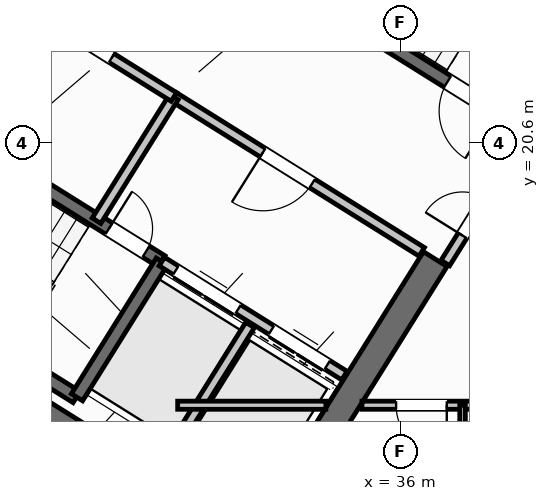
"""IFC4 building model, lengths in metres.
Left out: names, types, materials, properties, quantities, classifications, styles, units other than length and angle.
Written with IfcOpenShell. Run it as: python <this file> out.ifc"""

import sys

from ifc_helpers import new_model, si_unit, direction, frame, frame_2d, origin, place, context, subcontext, project, spatial, rectangle, extrude, source, transform, mapped, element, fill, save


model = new_model("IFC4")
c1 = context("Model", 3, precision=1e-05, world=origin(), true_north=direction((0.0, 1.0)))
c2 = subcontext(c1, "Body", "Model", "MODEL_VIEW")
j1 = project(units=[si_unit("LENGTHUNIT", "METRE"), si_unit("PLANEANGLEUNIT", "RADIAN")], contexts=[c1])
p1 = place(None, origin())
s1 = spatial("IfcSite", under=j1, at=p1, CompositionType="ELEMENT")
p2 = place(p1, origin())
s2 = spatial("IfcBuilding", under=s1, at=p2, CompositionType="ELEMENT")
p3 = place(p2, frame((0.0, 0.0, 119.7)))
s3 = spatial("IfcBuildingStorey", under=s2, at=p3, CompositionType="ELEMENT", Elevation=119.7)
p4 = place(p3, frame((33.366, 12.477, 0.0), z_axis=(0.0, 0.0, 1.0), x_axis=(-0.848047359947, 0.529920442413, 0.0)))
e1 = element("IfcWall", 1, at=p4, inside=s3, PredefinedType="SHEAR", context=c2, shape_type="SweptSolid", body=[
    extrude(rectangle(XDim=13.14, YDim=0.55, at=frame_2d((6.57, 0.0))), origin(), (0.0, 0.0, 1.0), 3.35),
])
p5 = place(p3, frame((36.683, 18.304, 0.0), z_axis=(0.0, 0.0, 1.0), x_axis=(-0.529896466841, -0.848062341122, 0.0)))
e2 = element("IfcWall", 2, at=p5, inside=s3, PredefinedType="SHEAR", context=c2, shape_type="SweptSolid", body=[
    extrude(rectangle(XDim=6.425, YDim=0.55, at=frame_2d((3.212, 0.0))), origin(), (0.0, 0.0, 1.0), 3.35),
])
p6 = place(p3, frame((31.76, 12.183, 0.0), z_axis=(0.0, 0.0, 1.0), x_axis=(-0.848047074256, 0.529920899612, 0.0)))
e3 = element("IfcWall", 3, at=p6, inside=s3, PredefinedType="STANDARD", context=c2, shape_type="SweptSolid", body=[
    extrude(rectangle(XDim=30.652, YDim=0.32, at=frame_2d((15.326, 0.0))), origin(), (0.0, 0.0, 1.0), 3.35),
])
p7 = place(p6, frame((15.153, 0.0, 0.0)))
e4 = element("IfcOpeningElement", 4, at=p7, cuts=e3, PredefinedType="OPENING", context=c2, shape_type="SweptSolid", body=[
    extrude(rectangle(XDim=1.2, YDim=2.15, at=frame_2d((0.6, 1.075))), frame((0.0, 0.17, 0.0), z_axis=(0.0, -1.0, 0.0), x_axis=(1.0, 0.0, 0.0)), (0.0, 0.0, 1.0), 0.34),
])
p8 = place(p6, frame((2.002, 0.0, 0.8)))
e5 = element("IfcOpeningElement", 5, at=p8, cuts=e3, PredefinedType="OPENING", context=c2, shape_type="SweptSolid", body=[
    extrude(rectangle(XDim=2.1, YDim=1.55, at=frame_2d((1.05, 0.775))), frame((0.0, 0.17, 0.0), z_axis=(0.0, -1.0, 0.0), x_axis=(1.0, 0.0, 0.0)), (0.0, 0.0, 1.0), 0.34),
])
p9 = place(p6, frame((7.206, 0.0, 0.8)))
e6 = element("IfcOpeningElement", 6, at=p9, cuts=e3, PredefinedType="OPENING", context=c2, shape_type="SweptSolid", body=[
    extrude(rectangle(XDim=2.1, YDim=1.55, at=frame_2d((1.05, 0.775))), frame((0.0, 0.17, 0.0), z_axis=(0.0, -1.0, 0.0), x_axis=(1.0, 0.0, 0.0)), (0.0, 0.0, 1.0), 0.34),
])
p10 = place(p6, frame((12.648, 0.0, 1.0)))
e7 = element("IfcOpeningElement", 7, at=p10, cuts=e3, PredefinedType="OPENING", context=c2, shape_type="SweptSolid", body=[
    extrude(rectangle(XDim=0.9, YDim=1.25, at=frame_2d((0.45, 0.625))), frame((0.0, 0.17, 0.0), z_axis=(0.0, -1.0, 0.0), x_axis=(1.0, 0.0, 0.0)), (0.0, 0.0, 1.0), 0.34),
])
p11 = place(p6, frame((19.458, 0.0, 0.95)))
e8 = element("IfcOpeningElement", 8, at=p11, cuts=e3, PredefinedType="OPENING", context=c2, shape_type="SweptSolid", body=[
    extrude(rectangle(XDim=1.2, YDim=1.4, at=frame_2d((0.6, 0.7))), frame((0.0, 0.17, 0.0), z_axis=(0.0, -1.0, 0.0), x_axis=(1.0, 0.0, 0.0)), (0.0, 0.0, 1.0), 0.34),
])
p12 = place(p6, frame((21.858, 0.0, 0.95)))
e9 = element("IfcOpeningElement", 9, at=p12, cuts=e3, PredefinedType="OPENING", context=c2, shape_type="SweptSolid", body=[
    extrude(rectangle(XDim=1.2, YDim=1.4, at=frame_2d((0.6, 0.7))), frame((0.0, 0.17, 0.0), z_axis=(0.0, -1.0, 0.0), x_axis=(1.0, 0.0, 0.0)), (0.0, 0.0, 1.0), 0.34),
])
p13 = place(p6, frame((27.266, 0.0, 0.8)))
e10 = element("IfcOpeningElement", 10, at=p13, cuts=e3, PredefinedType="OPENING", context=c2, shape_type="SweptSolid", body=[
    extrude(rectangle(XDim=2.1, YDim=1.55, at=frame_2d((1.05, 0.775))), frame((0.0, 0.17, 0.0), z_axis=(0.0, -1.0, 0.0), x_axis=(1.0, 0.0, 0.0)), (0.0, 0.0, 1.0), 0.34),
])
p14 = place(p3, frame((29.605, 15.581, 0.0), z_axis=(0.0, 0.0, 1.0), x_axis=(-0.848036911448, 0.529937163087, 0.0)))
e11 = element("IfcWall", 11, at=p14, inside=s3, PredefinedType="SHEAR", context=c2, shape_type="SweptSolid", body=[
    extrude(rectangle(XDim=7.46, YDim=0.26, at=frame_2d((3.73, 0.0))), origin(), (0.0, 0.0, 1.0), 3.35),
])
p15 = place(p3, frame((31.28, 18.261, 0.0), z_axis=(0.0, 0.0, 1.0), x_axis=(-0.848051618787, 0.529913626805, 0.0)))
e12 = element("IfcWall", 12, at=p15, inside=s3, PredefinedType="SHEAR", context=c2, shape_type="SweptSolid", body=[
    extrude(rectangle(XDim=7.46, YDim=0.26, at=frame_2d((3.73, 0.0))), origin(), (0.0, 0.0, 1.0), 3.35),
])
p16 = place(p15, frame((0.36, 0.0, 0.0)))
e13 = element("IfcOpeningElement", 13, at=p16, cuts=e12, PredefinedType="OPENING", context=c2, shape_type="SweptSolid", body=[
    extrude(rectangle(XDim=0.86, YDim=2.05, at=frame_2d((0.43, 1.025))), frame((0.0, 0.14, 0.0), z_axis=(0.0, -1.0, 0.0), x_axis=(1.0, 0.0, 0.0)), (0.0, 0.0, 1.0), 0.28),
])
p17 = place(p3, frame((31.288, 18.256, 0.0), z_axis=(0.0, 0.0, 1.0), x_axis=(-0.529943379326, -0.848033026897, 0.0)))
e14 = element("IfcWall", 14, at=p17, inside=s3, PredefinedType="SHEAR", context=c2, shape_type="SweptSolid", body=[
    extrude(rectangle(XDim=3.16, YDim=0.26, at=frame_2d((1.58, 0.0))), origin(), (0.0, 0.0, 1.0), 3.35),
])
p18 = place(p3, frame((38.046, 21.108, 0.0), z_axis=(0.0, 0.0, 1.0), x_axis=(-0.848054434086, 0.529909121291, 0.0)))
e15 = element("IfcWall", 15, at=p18, inside=s3, PredefinedType="SHEAR", context=c2, shape_type="SweptSolid", body=[
    extrude(rectangle(XDim=7.33, YDim=0.26, at=frame_2d((3.665, 0.0))), origin(), (0.0, 0.0, 1.0), 3.35),
])
p19 = place(p18, frame((0.22, 0.0, 0.0)))
e16 = element("IfcOpeningElement", 16, at=p19, cuts=e15, PredefinedType="OPENING", context=c2, shape_type="SweptSolid", body=[
    extrude(rectangle(XDim=1.1, YDim=2.1, at=frame_2d((0.55, 1.05))), frame((0.0, 0.14, 0.0), z_axis=(0.0, -1.0, 0.0), x_axis=(1.0, 0.0, 0.0)), (0.0, 0.0, 1.0), 0.28),
])
p20 = place(p3, frame((34.891, 16.005, 0.0), z_axis=(0.0, 0.0, 1.0), x_axis=(-0.848062873452, 0.529895614884, 0.0)))
e17 = element("IfcWall", 17, at=p20, inside=s3, PredefinedType="STANDARD", context=c2, shape_type="SweptSolid", body=[
    extrude(rectangle(XDim=4.248, YDim=0.2, at=frame_2d((2.124, 0.0))), origin(), (0.0, 0.0, 1.0), 3.34),
])
p21 = place(p20, frame((0.398, 0.0, 0.0)))
e18 = element("IfcOpeningElement", 18, at=p21, cuts=e17, PredefinedType="OPENING", context=c2, shape_type="SweptSolid", body=[
    extrude(rectangle(XDim=1.3, YDim=2.2, at=frame_2d((0.65, 1.1))), frame((0.0, 0.11, 0.0), z_axis=(0.0, -1.0, 0.0), x_axis=(1.0, 0.0, 0.0)), (0.0, 0.0, 1.0), 0.22),
])
p22 = place(p20, frame((2.473, 0.0, 0.0)))
e19 = element("IfcOpeningElement", 19, at=p22, cuts=e17, PredefinedType="OPENING", context=c2, shape_type="SweptSolid", body=[
    extrude(rectangle(XDim=1.45, YDim=2.25, at=frame_2d((0.725, 1.125))), frame((0.0, 0.11, 0.0), z_axis=(0.0, -1.0, 0.0), x_axis=(1.0, 0.0, 0.0)), (0.0, 0.0, 1.0), 0.22),
])
p23 = place(p3, frame((36.417, 18.447, 0.0), z_axis=(0.0, 0.0, 1.0), x_axis=(-0.848064879198, 0.529892404805, 0.0)))
e20 = element("IfcWall", 20, at=p23, inside=s3, PredefinedType="STANDARD", context=c2, shape_type="SweptSolid", body=[
    extrude(rectangle(XDim=5.768, YDim=0.2, at=frame_2d((2.884, 0.0))), origin(), (0.0, 0.0, 1.0), 3.34),
])
p24 = place(p23, frame((2.548, 0.0, 0.0)))
e21 = element("IfcOpeningElement", 21, at=p24, cuts=e20, PredefinedType="OPENING", context=c2, shape_type="SweptSolid", body=[
    extrude(rectangle(XDim=1.15, YDim=2.1, at=frame_2d((0.575, 1.05))), frame((0.0, 0.11, 0.0), z_axis=(0.0, -1.0, 0.0), x_axis=(1.0, 0.0, 0.0)), (0.0, 0.0, 1.0), 0.22),
])
p25 = place(p3, frame((33.029, 17.003, 0.0), z_axis=(0.0, 0.0, 1.0), x_axis=(-0.529916267533, -0.848049968695, 0.0)))
e22 = element("IfcWall", 22, at=p25, inside=s3, PredefinedType="STANDARD", context=c2, shape_type="SweptSolid", body=[
    extrude(rectangle(XDim=2.92, YDim=0.2, at=frame_2d((1.46, 0.0))), origin(), (0.0, 0.0, 1.0), 3.34),
])
p26 = place(p3, frame((31.525, 21.504, 0.0), z_axis=(0.0, 0.0, 1.0), x_axis=(-0.529907497854, -0.848055448493, 0.0)))
e23 = element("IfcWall", 23, at=p26, inside=s3, PredefinedType="STANDARD", context=c2, shape_type="SweptSolid", body=[
    extrude(rectangle(XDim=2.88, YDim=0.2, at=frame_2d((1.44, 0.0))), origin(), (0.0, 0.0, 1.0), 3.34),
])
p27 = place(p3, frame((31.525, 21.504, 0.0), z_axis=(0.0, 0.0, 1.0), x_axis=(-0.848040211232, 0.529931882541, 0.0)))
e24 = element("IfcWall", 24, at=p27, inside=s3, PredefinedType="STANDARD", context=c2, shape_type="SweptSolid", body=[
    extrude(rectangle(XDim=6.218, YDim=0.2, at=frame_2d((3.109, 0.0))), origin(), (0.0, 0.0, 1.0), 3.34),
])
p28 = place(p27, frame((4.4, 0.0, 0.0)))
e25 = element("IfcOpeningElement", 25, at=p28, cuts=e24, PredefinedType="OPENING", context=c2, shape_type="SweptSolid", body=[
    extrude(rectangle(XDim=0.86, YDim=2.05, at=frame_2d((0.43, 1.025))), frame((0.0, 0.11, 0.0), z_axis=(0.0, -1.0, 0.0), x_axis=(1.0, 0.0, 0.0)), (0.0, 0.0, 1.0), 0.22),
])
p29 = place(p27, frame((1.45, 0.0, 0.0)))
e26 = element("IfcOpeningElement", 26, at=p29, cuts=e24, PredefinedType="OPENING", context=c2, shape_type="SweptSolid", body=[
    extrude(rectangle(XDim=0.86, YDim=2.05, at=frame_2d((0.43, 1.025))), frame((0.0, 0.11, 0.0), z_axis=(0.0, -1.0, 0.0), x_axis=(1.0, 0.0, 0.0)), (0.0, 0.0, 1.0), 0.22),
])
p30 = place(p3, frame((38.451, 20.737, 0.0), z_axis=(0.0, 0.0, 1.0), x_axis=(-0.529924799939, -0.848044637038, 0.0)))
e27 = element("IfcWall", 27, at=p30, inside=s3, PredefinedType="STANDARD", context=c2, shape_type="SweptSolid", body=[
    extrude(rectangle(XDim=2.96, YDim=0.2, at=frame_2d((1.48, 0.0))), origin(), (0.0, 0.0, 1.0), 3.34),
])
p31 = place(p30, frame((1.46, 0.0, 0.0)))
e28 = element("IfcOpeningElement", 28, at=p31, cuts=e27, PredefinedType="OPENING", context=c2, shape_type="SweptSolid", body=[
    extrude(rectangle(XDim=0.86, YDim=2.05, at=frame_2d((0.43, 1.025))), frame((0.0, 0.11, 0.0), z_axis=(0.0, -1.0, 0.0), x_axis=(1.0, 0.0, 0.0)), (0.0, 0.0, 1.0), 0.22),
])
p32 = place(p3, frame((31.6, 15.42, 0.0), z_axis=(0.0, 0.0, 1.0), x_axis=(1.0, 0.0, 0.0)))
e29 = element("IfcWall", 29, at=p32, inside=s3, PredefinedType="PARTITIONING", context=c2, shape_type="SweptSolid", body=[
    extrude(rectangle(XDim=2.925, YDim=0.16, at=frame_2d((1.462, 0.0))), origin(), (0.0, 0.0, 1.0), 3.34),
])
p33 = place(p3, frame((35.237, 15.42, 0.0), z_axis=(0.0, 0.0, 1.0), x_axis=(1.0, 0.0, 0.0)))
e30 = element("IfcWall", 30, at=p33, inside=s3, PredefinedType="PARTITIONING", context=c2, shape_type="SweptSolid", body=[
    extrude(rectangle(XDim=15.432, YDim=0.16, at=frame_2d((7.716, 0.0))), origin(), (0.0, 0.0, 1.0), 3.34),
])
p34 = place(p33, frame((0.674, 0.0, 0.0)))
e31 = element("IfcOpeningElement", 31, at=p34, cuts=e30, PredefinedType="OPENING", context=c2, shape_type="SweptSolid", body=[
    extrude(rectangle(XDim=1.0, YDim=2.1, at=frame_2d((0.5, 1.05))), frame((0.0, 0.09, 0.0), z_axis=(0.0, -1.0, 0.0), x_axis=(1.0, 0.0, 0.0)), (0.0, 0.0, 1.0), 0.18),
])
p35 = place(p33, frame((9.094, 0.0, 0.0)))
e32 = element("IfcOpeningElement", 32, at=p35, cuts=e30, PredefinedType="OPENING", context=c2, shape_type="SweptSolid", body=[
    extrude(rectangle(XDim=1.0, YDim=2.1, at=frame_2d((0.5, 1.05))), frame((0.0, 0.09, 0.0), z_axis=(0.0, -1.0, 0.0), x_axis=(1.0, 0.0, 0.0)), (0.0, 0.0, 1.0), 0.18),
])
p36 = place(p3, frame((37.222, 1.96, 0.0), z_axis=(0.0, 0.0, 1.0), x_axis=(0.0, 1.0, 0.0)))
e33 = element("IfcWall", 33, at=p36, inside=s3, PredefinedType="PARTITIONING", context=c2, shape_type="SweptSolid", body=[
    extrude(rectangle(XDim=13.46, YDim=0.11, at=frame_2d((6.73, 0.0))), origin(), (0.0, 0.0, 1.0), 3.34),
])
p37 = place(p36, frame((5.2, 0.0, 0.0)))
e34 = element("IfcOpeningElement", 34, at=p37, cuts=e33, PredefinedType="OPENING", context=c2, shape_type="SweptSolid", body=[
    extrude(rectangle(XDim=0.92, YDim=2.08, at=frame_2d((0.46, 1.04))), frame((0.0, 0.065, 0.0), z_axis=(0.0, -1.0, 0.0), x_axis=(1.0, 0.0, 0.0)), (0.0, 0.0, 1.0), 0.13),
])
p38 = place(p36, frame((10.45, 0.0, 0.0)))
e35 = element("IfcOpeningElement", 35, at=p38, cuts=e33, PredefinedType="OPENING", context=c2, shape_type="SweptSolid", body=[
    extrude(rectangle(XDim=0.88, YDim=2.08, at=frame_2d((0.44, 1.04))), frame((0.0, 0.065, 0.0), z_axis=(0.0, -1.0, 0.0), x_axis=(1.0, 0.0, 0.0)), (0.0, 0.0, 1.0), 0.13),
])
m1 = source(origin(), c2, "Body", "SweptSolid", [
    extrude(rectangle(XDim=0.86, YDim=2.05, at=frame_2d((0.43, 1.025))), frame((0.0, 0.025, 0.0), z_axis=(0.0, -1.0, 0.0), x_axis=(1.0, 0.0, 0.0)), (0.0, 0.0, 1.0), 0.05),
])
p39 = place(p16, frame((0.86, 0.0, 0.0), z_axis=(0.0, 0.0, 1.0), x_axis=(-1.0, 0.0, 0.0)))
e36 = element("IfcDoor", 36, at=p39, inside=s3, OperationType="SINGLE_SWING_LEFT", PredefinedType="DOOR", context=c2, shape_type="MappedRepresentation", body=[
    mapped(m1, transform((0.0, 0.0, 0.0), scale=1.0)),
])
fill(e13, e36)
m2 = source(origin(), c2, "Body", "SweptSolid", [
    extrude(rectangle(XDim=1.1, YDim=2.1, at=frame_2d((0.55, 1.05))), frame((0.0, 0.025, 0.0), z_axis=(0.0, -1.0, 0.0), x_axis=(1.0, 0.0, 0.0)), (0.0, 0.0, 1.0), 0.05),
])
p40 = place(p19, origin())
e37 = element("IfcDoor", 37, at=p40, inside=s3, OperationType="SINGLE_SWING_LEFT", PredefinedType="DOOR", context=c2, shape_type="MappedRepresentation", body=[
    mapped(m2, transform((0.0, 0.0, 0.0), scale=1.0)),
])
fill(e16, e37)
m3 = source(origin(), c2, "Body", "SweptSolid", [
    extrude(rectangle(XDim=1.15, YDim=2.1, at=frame_2d((0.575, 1.05))), frame((0.0, 0.025, 0.0), z_axis=(0.0, -1.0, 0.0), x_axis=(1.0, 0.0, 0.0)), (0.0, 0.0, 1.0), 0.05),
])
p41 = place(p24, origin())
e38 = element("IfcDoor", 38, at=p41, inside=s3, OperationType="SINGLE_SWING_RIGHT", PredefinedType="DOOR", context=c2, shape_type="MappedRepresentation", body=[
    mapped(m3, transform((0.0, 0.0, 0.0), scale=1.0)),
])
fill(e21, e38)
m4 = source(origin(), c2, "Body", "SweptSolid", [
    extrude(rectangle(XDim=1.3, YDim=2.2, at=frame_2d((0.65, 1.1))), frame((0.0, 0.025, 0.0), z_axis=(0.0, -1.0, 0.0), x_axis=(1.0, 0.0, 0.0)), (0.0, 0.0, 1.0), 0.05),
])
p42 = place(p21, origin())
e39 = element("IfcDoor", 39, at=p42, inside=s3, OperationType="DOUBLE_DOOR_SLIDING", PredefinedType="DOOR", context=c2, shape_type="MappedRepresentation", body=[
    mapped(m4, transform((0.0, 0.0, 0.0), scale=1.0)),
])
fill(e18, e39)
m5 = source(origin(), c2, "Body", "SweptSolid", [
    extrude(rectangle(XDim=1.45, YDim=2.25, at=frame_2d((0.725, 1.125))), frame((0.0, 0.025, 0.0), z_axis=(0.0, -1.0, 0.0), x_axis=(1.0, 0.0, 0.0)), (0.0, 0.0, 1.0), 0.05),
])
p43 = place(p22, origin())
e40 = element("IfcDoor", 40, at=p43, inside=s3, OperationType="DOUBLE_DOOR_SLIDING", PredefinedType="DOOR", context=c2, shape_type="MappedRepresentation", body=[
    mapped(m5, transform((0.0, 0.0, 0.0), scale=1.0)),
])
fill(e19, e40)
p44 = place(p29, frame((0.86, 0.0, 0.0), z_axis=(0.0, 0.0, 1.0), x_axis=(-1.0, 0.0, 0.0)))
e41 = element("IfcDoor", 41, at=p44, inside=s3, OperationType="SINGLE_SWING_RIGHT", PredefinedType="DOOR", context=c2, shape_type="MappedRepresentation", body=[
    mapped(m1, transform((0.0, 0.0, 0.0), scale=1.0)),
])
fill(e26, e41)
p45 = place(p31, frame((0.86, 0.0, 0.0), z_axis=(0.0, 0.0, 1.0), x_axis=(-1.0, 0.0, 0.0)))
e42 = element("IfcDoor", 42, at=p45, inside=s3, OperationType="SINGLE_SWING_LEFT", PredefinedType="DOOR", context=c2, shape_type="MappedRepresentation", body=[
    mapped(m1, transform((0.0, 0.0, 0.0), scale=1.0)),
])
fill(e28, e42)
m6 = source(origin(), c2, "Body", "SweptSolid", [
    extrude(rectangle(XDim=1.0, YDim=2.1, at=frame_2d((0.5, 1.05))), frame((0.0, 0.025, 0.0), z_axis=(0.0, -1.0, 0.0), x_axis=(1.0, 0.0, 0.0)), (0.0, 0.0, 1.0), 0.05),
])
p46 = place(p34, frame((1.0, 0.0, 0.0), z_axis=(0.0, 0.0, 1.0), x_axis=(-1.0, 0.0, 0.0)))
e43 = element("IfcDoor", 43, at=p46, inside=s3, OperationType="SINGLE_SWING_LEFT", PredefinedType="DOOR", context=c2, shape_type="MappedRepresentation", body=[
    mapped(m6, transform((0.0, 0.0, 0.0), scale=1.0)),
])
fill(e31, e43)
save(model, sys.argv[1])
